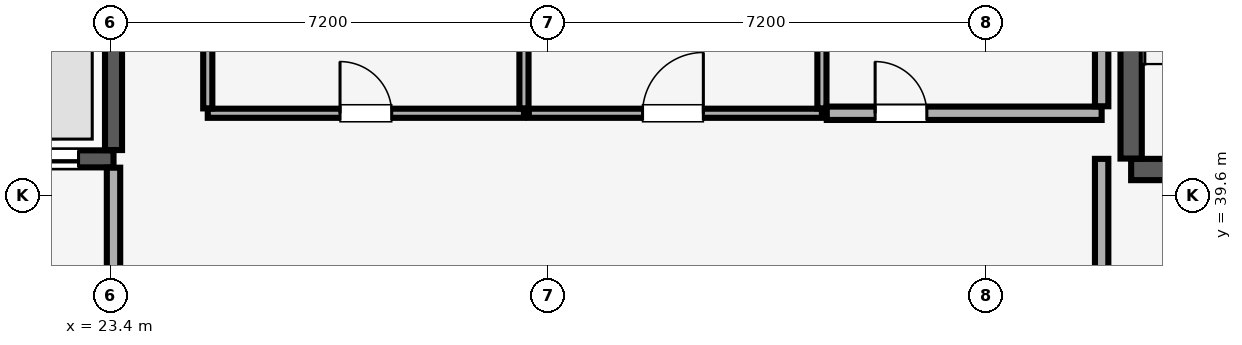
"""IFC4 building model, lengths in metres.
Left out: names, types, materials, properties, quantities, classifications, styles, units other than length and angle.
Written with IfcOpenShell. Run it as: python <this file> out.ifc"""

import sys

from ifc_helpers import new_model, si_unit, direction, frame, frame_2d, origin, place, context, subcontext, project, spatial, rectangle, extrude, element, fill, save


model = new_model("IFC4")
c1 = context("Model", 3, precision=1e-05, world=origin(), true_north=direction((0.0, 1.0)))
c2 = subcontext(c1, "Body", "Model", "MODEL_VIEW")
j1 = project(units=[si_unit("LENGTHUNIT", "METRE"), si_unit("PLANEANGLEUNIT", "RADIAN")], contexts=[c1])
p1 = place(None, origin())
s1 = spatial("IfcSite", under=j1, at=p1, CompositionType="ELEMENT")
p2 = place(p1, origin())
s2 = spatial("IfcBuilding", under=s1, at=p2, CompositionType="ELEMENT")
p3 = place(p2, frame((0.0, 0.0, 8.0)))
s3 = spatial("IfcBuildingStorey", under=s2, at=p3, CompositionType="ELEMENT", Elevation=8.0)
p4 = place(p3, frame((40.185, 40.025, 0.0), z_axis=(0.0, 0.0, 1.0), x_axis=(1.0, 0.0, 0.0)))
e1 = element("IfcWall", 1, at=p4, inside=s3, PredefinedType="SHEAR", context=c2, shape_type="SweptSolid", body=[
    extrude(rectangle(XDim=3.63, YDim=0.35, at=frame_2d((1.815, 0.0))), origin(), (0.0, 0.0, 1.0), 5.68),
])
p5 = place(p4, frame((1.24, 0.0, 0.0)))
e2 = element("IfcOpeningElement", 2, at=p5, cuts=e1, PredefinedType="OPENING", context=c2, shape_type="SweptSolid", body=[
    extrude(rectangle(XDim=1.15, YDim=2.15, at=frame_2d((0.575, 1.075))), frame((0.0, 0.185, 0.0), z_axis=(0.0, -1.0, 0.0), x_axis=(1.0, 0.0, 0.0)), (0.0, 0.0, 1.0), 0.37),
])
p6 = place(p3, frame((40.185, 40.205, 0.0), z_axis=(0.0, 0.0, 1.0), x_axis=(0.0, 1.0, 0.0)))
e3 = element("IfcWall", 3, at=p6, inside=s3, PredefinedType="SHEAR", context=c2, shape_type="SweptSolid", body=[
    extrude(rectangle(XDim=8.09, YDim=0.35, at=frame_2d((4.045, 0.0))), origin(), (0.0, 0.0, 1.0), 5.68),
])
p7 = place(p3, frame((21.035, 40.2, 0.0), z_axis=(0.0, 0.0, 1.0), x_axis=(1.0, 0.0, 0.0)))
e4 = element("IfcWall", 4, at=p7, inside=s3, PredefinedType="SHEAR", context=c2, shape_type="SweptSolid", body=[
    extrude(rectangle(XDim=2.415, YDim=0.28, at=frame_2d((1.208, 0.0))), origin(), (0.0, 0.0, 1.0), 5.68),
])
p8 = place(p7, frame((0.54, 0.0, 0.0)))
e5 = element("IfcOpeningElement", 5, at=p8, cuts=e4, PredefinedType="OPENING", context=c2, shape_type="SweptSolid", body=[
    extrude(rectangle(XDim=1.3, YDim=2.3, at=frame_2d((0.65, 1.15))), frame((0.0, 0.15, 0.0), z_axis=(0.0, -1.0, 0.0), x_axis=(1.0, 0.0, 0.0)), (0.0, 0.0, 1.0), 0.3),
])
p9 = place(p3, frame((23.45, 40.345, 0.0), z_axis=(0.0, 0.0, 1.0), x_axis=(0.0, 1.0, 0.0)))
e6 = element("IfcWall", 6, at=p9, inside=s3, PredefinedType="SHEAR", context=c2, shape_type="SweptSolid", body=[
    extrude(rectangle(XDim=2.81, YDim=0.28, at=frame_2d((1.405, 0.0))), origin(), (0.0, 0.0, 1.0), 5.68),
])
p10 = place(p3, frame((23.45, 34.415, 0.0), z_axis=(0.0, 0.0, 1.0), x_axis=(0.0, 1.0, 0.0)))
e7 = element("IfcWall", 7, at=p10, inside=s3, PredefinedType="PARTITIONING", context=c2, shape_type="SweptSolid", body=[
    extrude(rectangle(XDim=5.64, YDim=0.22, at=frame_2d((2.82, 0.0))), origin(), (0.0, 0.0, 1.0), 5.68),
])
p11 = place(p3, frame((39.7, 34.415, 0.0), z_axis=(0.0, 0.0, 1.0), x_axis=(0.0, 1.0, 0.0)))
e8 = element("IfcWall", 8, at=p11, inside=s3, PredefinedType="PARTITIONING", context=c2, shape_type="SweptSolid", body=[
    extrude(rectangle(XDim=5.785, YDim=0.22, at=frame_2d((2.893, 0.0))), origin(), (0.0, 0.0, 1.0), 5.68),
])
p12 = place(p3, frame((25.0, 40.95, 0.0), z_axis=(0.0, 0.0, 1.0), x_axis=(1.0, 0.0, 0.0)))
e9 = element("IfcWall", 9, at=p12, inside=s3, PredefinedType="PARTITIONING", context=c2, shape_type="SweptSolid", body=[
    extrude(rectangle(XDim=5.2, YDim=0.15, at=frame_2d((2.6, 0.0))), origin(), (0.0, 0.0, 1.0), 5.68),
])
p13 = place(p12, frame((2.175, 0.0, 0.0)))
e10 = element("IfcOpeningElement", 10, at=p13, cuts=e9, PredefinedType="OPENING", context=c2, shape_type="SweptSolid", body=[
    extrude(rectangle(XDim=0.85, YDim=2.1, at=frame_2d((0.425, 1.05))), frame((0.0, 0.085, 0.0), z_axis=(0.0, -1.0, 0.0), x_axis=(1.0, 0.0, 0.0)), (0.0, 0.0, 1.0), 0.17),
])
for number, where, z_axis, x_axis in (
    (11, (25.0, 41.03, 0.0), (0.0, 0.0, 1.0), (0.0, 1.0, 0.0)),
    (12, (30.2, 41.03, 0.0), (0.0, 0.0, 1.0), (0.0, 1.0, 0.0)),
):
    element("IfcWall", number, at=place(p3, frame(where, z_axis=z_axis, x_axis=x_axis)), inside=s3, PredefinedType="PARTITIONING", context=c2, shape_type="SweptSolid", body=[
        extrude(rectangle(XDim=7.19, YDim=0.15, at=frame_2d((3.595, 0.0))), origin(), (0.0, 0.0, 1.0), 5.68),
    ])
p14 = place(p3, frame((30.28, 40.95, 0.0), z_axis=(0.0, 0.0, 1.0), x_axis=(1.0, 0.0, 0.0)))
e13 = element("IfcWall", 13, at=p14, inside=s3, PredefinedType="PARTITIONING", context=c2, shape_type="SweptSolid", body=[
    extrude(rectangle(XDim=4.82, YDim=0.15, at=frame_2d((2.41, 0.0))), origin(), (0.0, 0.0, 1.0), 5.68),
])
p15 = place(p14, frame((1.87, 0.0, 0.0)))
e14 = element("IfcOpeningElement", 14, at=p15, cuts=e13, PredefinedType="OPENING", context=c2, shape_type="SweptSolid", body=[
    extrude(rectangle(XDim=1.0, YDim=2.15, at=frame_2d((0.5, 1.075))), frame((0.0, 0.085, 0.0), z_axis=(0.0, -1.0, 0.0), x_axis=(1.0, 0.0, 0.0)), (0.0, 0.0, 1.0), 0.17),
])
p16 = place(p3, frame((35.1, 41.03, 0.0), z_axis=(0.0, 0.0, 1.0), x_axis=(0.0, 1.0, 0.0)))
e15 = element("IfcWall", 15, at=p16, inside=s3, PredefinedType="PARTITIONING", context=c2, shape_type="SweptSolid", body=[
    extrude(rectangle(XDim=7.19, YDim=0.15, at=frame_2d((3.595, 0.0))), origin(), (0.0, 0.0, 1.0), 5.68),
])
p17 = place(p3, frame((35.18, 40.95, 0.0), z_axis=(0.0, 0.0, 1.0), x_axis=(1.0, 0.0, 0.0)))
e16 = element("IfcWall", 16, at=p17, inside=s3, PredefinedType="PARTITIONING", context=c2, shape_type="SweptSolid", body=[
    extrude(rectangle(XDim=4.52, YDim=0.22, at=frame_2d((2.26, 0.0))), origin(), (0.0, 0.0, 1.0), 5.68),
])
p18 = place(p17, frame((0.795, 0.0, 0.0)))
e17 = element("IfcOpeningElement", 17, at=p18, cuts=e16, PredefinedType="OPENING", context=c2, shape_type="SweptSolid", body=[
    extrude(rectangle(XDim=0.85, YDim=2.1, at=frame_2d((0.425, 1.05))), frame((0.0, 0.12, 0.0), z_axis=(0.0, -1.0, 0.0), x_axis=(1.0, 0.0, 0.0)), (0.0, 0.0, 1.0), 0.24),
])
p19 = place(p3, frame((39.7, 41.065, 0.0), z_axis=(0.0, 0.0, 1.0), x_axis=(0.0, 1.0, 0.0)))
e18 = element("IfcWall", 18, at=p19, inside=s3, PredefinedType="PARTITIONING", context=c2, shape_type="SweptSolid", body=[
    extrude(rectangle(XDim=7.12, YDim=0.22, at=frame_2d((3.56, 0.0))), origin(), (0.0, 0.0, 1.0), 5.68),
])
p20 = place(p8, origin())
e19 = element("IfcDoor", 19, at=p20, inside=s3, OperationType="DOUBLE_DOOR_SLIDING", PredefinedType="DOOR", context=c2, shape_type="SweptSolid", body=[
    extrude(rectangle(XDim=1.3, YDim=2.3, at=frame_2d((0.65, 1.15))), frame((0.0, 0.025, 0.0), z_axis=(0.0, -1.0, 0.0), x_axis=(1.0, 0.0, 0.0)), (0.0, 0.0, 1.0), 0.05),
])
fill(e5, e19)
p21 = place(p13, origin())
e20 = element("IfcDoor", 20, at=p21, inside=s3, OperationType="SINGLE_SWING_LEFT", PredefinedType="DOOR", context=c2, shape_type="SweptSolid", body=[
    extrude(rectangle(XDim=0.85, YDim=2.1, at=frame_2d((0.425, 1.05))), frame((0.0, 0.025, 0.0), z_axis=(0.0, -1.0, 0.0), x_axis=(1.0, 0.0, 0.0)), (0.0, 0.0, 1.0), 0.05),
])
fill(e10, e20)
p22 = place(p15, origin())
e21 = element("IfcDoor", 21, at=p22, inside=s3, OperationType="SINGLE_SWING_RIGHT", PredefinedType="DOOR", context=c2, shape_type="SweptSolid", body=[
    extrude(rectangle(XDim=1.0, YDim=2.15, at=frame_2d((0.5, 1.075))), frame((0.0, 0.025, 0.0), z_axis=(0.0, -1.0, 0.0), x_axis=(1.0, 0.0, 0.0)), (0.0, 0.0, 1.0), 0.05),
])
fill(e14, e21)
p23 = place(p18, origin())
e22 = element("IfcDoor", 22, at=p23, inside=s3, OperationType="SINGLE_SWING_LEFT", PredefinedType="DOOR", context=c2, shape_type="SweptSolid", body=[
    extrude(rectangle(XDim=0.85, YDim=2.1, at=frame_2d((0.425, 1.05))), frame((0.0, 0.025, 0.0), z_axis=(0.0, -1.0, 0.0), x_axis=(1.0, 0.0, 0.0)), (0.0, 0.0, 1.0), 0.05),
])
fill(e17, e22)
save(model, sys.argv[1])
